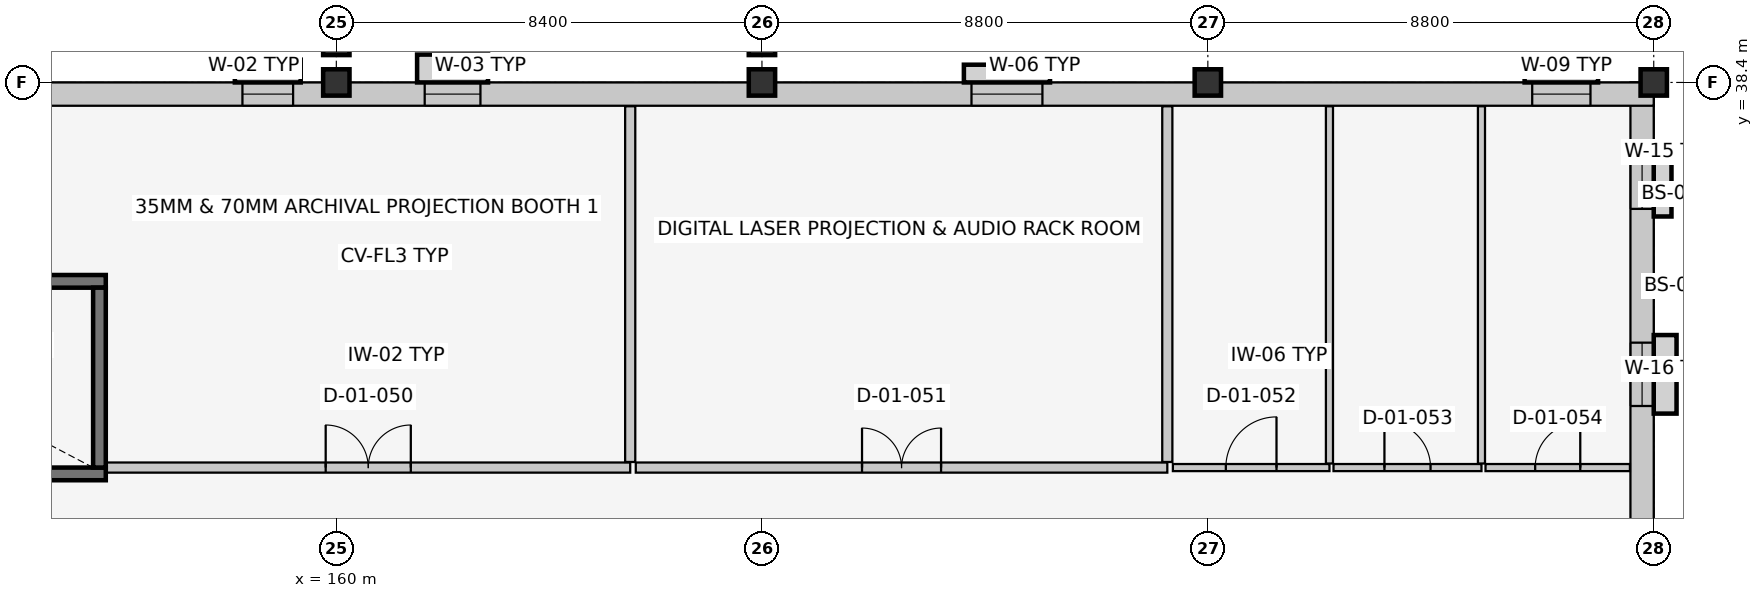
"""IFC4 building model, lengths in metres.
Left out: names, types, materials, properties, quantities, classifications, styles, units other than length and angle.
Written with IfcOpenShell. Run it as: python <this file> out.ifc"""

import sys

from ifc_helpers import new_model, si_unit, direction, frame, frame_2d, origin, origin_2d, place, context, subcontext, project, spatial, rectangle, extrude, element, fill, save


model = new_model("IFC4")
c1 = context("Model", 3, precision=1e-05, world=origin(), true_north=direction((0.0, 1.0)))
c2 = subcontext(c1, "Body", "Model", "MODEL_VIEW")
j1 = project(units=[si_unit("LENGTHUNIT", "METRE"), si_unit("PLANEANGLEUNIT", "RADIAN")], contexts=[c1])
p1 = place(None, origin())
s1 = spatial("IfcSite", under=j1, at=p1, CompositionType="ELEMENT")
p2 = place(p1, origin())
s2 = spatial("IfcBuilding", under=s1, at=p2, CompositionType="ELEMENT")
p3 = place(p2, frame((0.0, 0.0, 5.4)))
s3 = spatial("IfcBuildingStorey", under=s2, at=p3, CompositionType="ELEMENT", Elevation=5.4)
for number, where, z_axis, x_axis in (
    (1, (160.0, 38.4, 0.0), (0.0, 0.0, 1.0), (1.0, 0.0, 0.0)),
    (2, (168.4, 38.4, 0.0), (0.0, 0.0, 1.0), (1.0, 0.0, 0.0)),
    (3, (177.2, 38.4, 0.0), (0.0, 0.0, 1.0), (1.0, 0.0, 0.0)),
    (4, (186.0, 38.4, 0.0), (0.0, 0.0, 1.0), (1.0, 0.0, 0.0)),
    (5, (160.0, 39.2, 0.0), (0.0, 0.0, 1.0), (1.0, 0.0, 0.0)),
    (6, (168.4, 39.2, 0.0), (0.0, 0.0, 1.0), (1.0, 0.0, 0.0)),
):
    element("IfcColumn", number, at=place(p3, frame(where, z_axis=z_axis, x_axis=x_axis)), inside=s3, PredefinedType="COLUMN", context=c2, shape_type="SweptSolid", body=[
        extrude(rectangle(XDim=0.52, YDim=0.52, at=origin_2d()), origin(), (0.0, 0.0, 1.0), 4.2),
    ])
p4 = place(p3, frame((185.77, 38.4, 0.0), z_axis=(0.0, 0.0, 1.0), x_axis=(0.0, -1.0, 0.0)))
e7 = element("IfcWall", 7, at=p4, inside=s3, PredefinedType="SOLIDWALL", context=c2, shape_type="SweptSolid", body=[
    extrude(rectangle(XDim=38.4, YDim=0.46, at=frame_2d((19.2, 0.0))), origin(), (0.0, 0.0, 1.0), 3.095),
])
p5 = place(p4, frame((1.345, 0.0, 0.9)))
e8 = element("IfcOpeningElement", 8, at=p5, cuts=e7, PredefinedType="OPENING", context=c2, shape_type="SweptSolid", body=[
    extrude(rectangle(XDim=1.15, YDim=1.6, at=frame_2d((0.575, 0.8))), frame((0.0, 0.242, 0.0), z_axis=(0.0, -1.0, 0.0), x_axis=(1.0, 0.0, 0.0)), (0.0, 0.0, 1.0), 0.484),
])
p6 = place(p4, frame((5.135, 0.0, 0.9)))
e9 = element("IfcOpeningElement", 9, at=p6, cuts=e7, PredefinedType="OPENING", context=c2, shape_type="SweptSolid", body=[
    extrude(rectangle(XDim=1.25, YDim=1.6, at=frame_2d((0.625, 0.8))), frame((0.0, 0.242, 0.0), z_axis=(0.0, -1.0, 0.0), x_axis=(1.0, 0.0, 0.0)), (0.0, 0.0, 1.0), 0.484),
])
p7 = place(p3, frame((124.0, 38.17, 0.0), z_axis=(0.0, 0.0, 1.0), x_axis=(1.0, 0.0, 0.0)))
e10 = element("IfcWall", 10, at=p7, inside=s3, PredefinedType="SOLIDWALL", context=c2, shape_type="SweptSolid", body=[
    extrude(rectangle(XDim=62.0, YDim=0.46, at=frame_2d((31.0, 0.0))), origin(), (0.0, 0.0, 1.0), 3.095),
])
p8 = place(p7, frame((1.134, 0.0, 0.9)))
e11 = element("IfcOpeningElement", 11, at=p8, cuts=e10, PredefinedType="OPENING", context=c2, shape_type="SweptSolid", body=[
    extrude(rectangle(XDim=1.38, YDim=1.6, at=frame_2d((0.69, 0.8))), frame((0.0, 0.242, 0.0), z_axis=(0.0, -1.0, 0.0), x_axis=(1.0, 0.0, 0.0)), (0.0, 0.0, 1.0), 0.484),
])
p9 = place(p7, frame((4.721, 0.0, 0.9)))
e12 = element("IfcOpeningElement", 12, at=p9, cuts=e10, PredefinedType="OPENING", context=c2, shape_type="SweptSolid", body=[
    extrude(rectangle(XDim=1.5, YDim=1.6, at=frame_2d((0.75, 0.8))), frame((0.0, 0.242, 0.0), z_axis=(0.0, -1.0, 0.0), x_axis=(1.0, 0.0, 0.0)), (0.0, 0.0, 1.0), 0.484),
])
p10 = place(p7, frame((12.205, 0.0, 0.9)))
e13 = element("IfcOpeningElement", 13, at=p10, cuts=e10, PredefinedType="OPENING", context=c2, shape_type="SweptSolid", body=[
    extrude(rectangle(XDim=1.12, YDim=1.75, at=frame_2d((0.56, 0.875))), frame((0.0, 0.242, 0.0), z_axis=(0.0, -1.0, 0.0), x_axis=(1.0, 0.0, 0.0)), (0.0, 0.0, 1.0), 0.484),
])
p11 = place(p7, frame((15.792, 0.0, 0.9)))
e14 = element("IfcOpeningElement", 14, at=p11, cuts=e10, PredefinedType="OPENING", context=c2, shape_type="SweptSolid", body=[
    extrude(rectangle(XDim=1.24, YDim=1.75, at=frame_2d((0.62, 0.875))), frame((0.0, 0.242, 0.0), z_axis=(0.0, -1.0, 0.0), x_axis=(1.0, 0.0, 0.0)), (0.0, 0.0, 1.0), 0.484),
])
p12 = place(p7, frame((19.389, 0.0, 0.9)))
e15 = element("IfcOpeningElement", 15, at=p12, cuts=e10, PredefinedType="OPENING", context=c2, shape_type="SweptSolid", body=[
    extrude(rectangle(XDim=1.34, YDim=1.75, at=frame_2d((0.67, 0.875))), frame((0.0, 0.242, 0.0), z_axis=(0.0, -1.0, 0.0), x_axis=(1.0, 0.0, 0.0)), (0.0, 0.0, 1.0), 0.484),
])
p13 = place(p7, frame((34.147, 0.0, 0.9)))
e16 = element("IfcOpeningElement", 16, at=p13, cuts=e10, PredefinedType="OPENING", context=c2, shape_type="SweptSolid", body=[
    extrude(rectangle(XDim=1.0, YDim=1.35, at=frame_2d((0.5, 0.675))), frame((0.0, 0.242, 0.0), z_axis=(0.0, -1.0, 0.0), x_axis=(1.0, 0.0, 0.0)), (0.0, 0.0, 1.0), 0.484),
])
p14 = place(p7, frame((37.744, 0.0, 0.9)))
e17 = element("IfcOpeningElement", 17, at=p14, cuts=e10, PredefinedType="OPENING", context=c2, shape_type="SweptSolid", body=[
    extrude(rectangle(XDim=1.1, YDim=1.35, at=frame_2d((0.55, 0.675))), frame((0.0, 0.242, 0.0), z_axis=(0.0, -1.0, 0.0), x_axis=(1.0, 0.0, 0.0)), (0.0, 0.0, 1.0), 0.484),
])
p15 = place(p7, frame((48.535, 0.0, 0.9)))
e18 = element("IfcOpeningElement", 18, at=p15, cuts=e10, PredefinedType="OPENING", context=c2, shape_type="SweptSolid", body=[
    extrude(rectangle(XDim=1.4, YDim=1.35, at=frame_2d((0.7, 0.675))), frame((0.0, 0.242, 0.0), z_axis=(0.0, -1.0, 0.0), x_axis=(1.0, 0.0, 0.0)), (0.0, 0.0, 1.0), 0.484),
])
p16 = place(p7, frame((59.602, 0.0, 0.9)))
e19 = element("IfcOpeningElement", 19, at=p16, cuts=e10, PredefinedType="OPENING", context=c2, shape_type="SweptSolid", body=[
    extrude(rectangle(XDim=1.15, YDim=1.45, at=frame_2d((0.575, 0.725))), frame((0.0, 0.242, 0.0), z_axis=(0.0, -1.0, 0.0), x_axis=(1.0, 0.0, 0.0)), (0.0, 0.0, 1.0), 0.484),
])
for number, where, z_axis, x_axis in (
    (20, (146.55, 30.675, 0.0), (0.0, 0.0, 1.0), (1.0, 0.0, 0.0)),
    (21, (155.45, 34.475, 0.0), (0.0, 0.0, 1.0), (-1.0, 0.0, 0.0)),
):
    element("IfcWall", number, at=place(p3, frame(where, z_axis=z_axis, x_axis=x_axis)), inside=s3, PredefinedType="SHEAR", context=c2, shape_type="SweptSolid", body=[
        extrude(rectangle(XDim=8.9, YDim=0.25, at=frame_2d((4.45, 0.0))), origin(), (0.0, 0.0, 1.0), 3.94),
    ])
p17 = place(p3, frame((155.325, 30.8, 0.0), z_axis=(0.0, 0.0, 1.0), x_axis=(0.0, 1.0, 0.0)))
e22 = element("IfcWall", 22, at=p17, inside=s3, PredefinedType="SHEAR", context=c2, shape_type="SweptSolid", body=[
    extrude(rectangle(XDim=3.55, YDim=0.25, at=frame_2d((1.775, 0.0))), origin(), (0.0, 0.0, 1.0), 3.94),
])
p18 = place(p3, frame((155.46, 30.8, 0.0), z_axis=(0.0, 0.0, 1.0), x_axis=(1.0, 0.0, 0.0)))
e23 = element("IfcWall", 23, at=p18, inside=s3, PredefinedType="PARTITIONING", context=c2, shape_type="SweptSolid", body=[
    extrude(rectangle(XDim=10.34, YDim=0.2, at=frame_2d((5.17, 0.0))), origin(), (0.0, 0.0, 1.0), 3.94),
])
p19 = place(p18, frame((4.33, 0.0, 0.0)))
e24 = element("IfcOpeningElement", 24, at=p19, cuts=e23, PredefinedType="OPENING", context=c2, shape_type="SweptSolid", body=[
    extrude(rectangle(XDim=1.68, YDim=2.3, at=frame_2d((0.84, 1.15))), frame((0.0, 0.112, 0.0), z_axis=(0.0, -1.0, 0.0), x_axis=(1.0, 0.0, 0.0)), (0.0, 0.0, 1.0), 0.224),
])
p20 = place(p3, frame((165.8, 30.91, 0.0), z_axis=(0.0, 0.0, 1.0), x_axis=(0.0, 1.0, 0.0)))
e25 = element("IfcWall", 25, at=p20, inside=s3, PredefinedType="PARTITIONING", context=c2, shape_type="SweptSolid", body=[
    extrude(rectangle(XDim=7.02, YDim=0.2, at=frame_2d((3.51, 0.0))), origin(), (0.0, 0.0, 1.0), 3.94),
])
p21 = place(p3, frame((165.91, 30.8, 0.0), z_axis=(0.0, 0.0, 1.0), x_axis=(1.0, 0.0, 0.0)))
e26 = element("IfcWall", 26, at=p21, inside=s3, PredefinedType="PARTITIONING", context=c2, shape_type="SweptSolid", body=[
    extrude(rectangle(XDim=10.49, YDim=0.2, at=frame_2d((5.245, 0.0))), origin(), (0.0, 0.0, 1.0), 3.94),
])
p22 = place(p21, frame((4.465, 0.0, 0.0)))
e27 = element("IfcOpeningElement", 27, at=p22, cuts=e26, PredefinedType="OPENING", context=c2, shape_type="SweptSolid", body=[
    extrude(rectangle(XDim=1.56, YDim=2.25, at=frame_2d((0.78, 1.125))), frame((0.0, 0.112, 0.0), z_axis=(0.0, -1.0, 0.0), x_axis=(1.0, 0.0, 0.0)), (0.0, 0.0, 1.0), 0.224),
])
p23 = place(p3, frame((176.4, 30.91, 0.0), z_axis=(0.0, 0.0, 1.0), x_axis=(0.0, 1.0, 0.0)))
e28 = element("IfcWall", 28, at=p23, inside=s3, PredefinedType="PARTITIONING", context=c2, shape_type="SweptSolid", body=[
    extrude(rectangle(XDim=7.02, YDim=0.2, at=frame_2d((3.51, 0.0))), origin(), (0.0, 0.0, 1.0), 3.94),
])
p24 = place(p3, frame((176.51, 30.8, 0.0), z_axis=(0.0, 0.0, 1.0), x_axis=(1.0, 0.0, 0.0)))
e29 = element("IfcWall", 29, at=p24, inside=s3, PredefinedType="PARTITIONING", context=c2, shape_type="SweptSolid", body=[
    extrude(rectangle(XDim=3.09, YDim=0.14, at=frame_2d((1.545, 0.0))), origin(), (0.0, 0.0, 1.0), 3.94),
])
p25 = place(p24, frame((1.045, 0.0, 0.0)))
e30 = element("IfcOpeningElement", 30, at=p25, cuts=e29, PredefinedType="OPENING", context=c2, shape_type="SweptSolid", body=[
    extrude(rectangle(XDim=1.0, YDim=2.1, at=frame_2d((0.5, 1.05))), frame((0.0, 0.082, 0.0), z_axis=(0.0, -1.0, 0.0), x_axis=(1.0, 0.0, 0.0)), (0.0, 0.0, 1.0), 0.164),
])
p26 = place(p3, frame((179.6, 30.88, 0.0), z_axis=(0.0, 0.0, 1.0), x_axis=(0.0, 1.0, 0.0)))
e31 = element("IfcWall", 31, at=p26, inside=s3, PredefinedType="PARTITIONING", context=c2, shape_type="SweptSolid", body=[
    extrude(rectangle(XDim=7.05, YDim=0.14, at=frame_2d((3.525, 0.0))), origin(), (0.0, 0.0, 1.0), 3.94),
])
p27 = place(p3, frame((179.68, 30.8, 0.0), z_axis=(0.0, 0.0, 1.0), x_axis=(1.0, 0.0, 0.0)))
e32 = element("IfcWall", 32, at=p27, inside=s3, PredefinedType="PARTITIONING", context=c2, shape_type="SweptSolid", body=[
    extrude(rectangle(XDim=2.92, YDim=0.14, at=frame_2d((1.46, 0.0))), origin(), (0.0, 0.0, 1.0), 3.94),
])
p28 = place(p27, frame((1.005, 0.0, 0.0)))
e33 = element("IfcOpeningElement", 33, at=p28, cuts=e32, PredefinedType="OPENING", context=c2, shape_type="SweptSolid", body=[
    extrude(rectangle(XDim=0.91, YDim=2.06, at=frame_2d((0.455, 1.03))), frame((0.0, 0.082, 0.0), z_axis=(0.0, -1.0, 0.0), x_axis=(1.0, 0.0, 0.0)), (0.0, 0.0, 1.0), 0.164),
])
p29 = place(p3, frame((182.6, 30.88, 0.0), z_axis=(0.0, 0.0, 1.0), x_axis=(0.0, 1.0, 0.0)))
e34 = element("IfcWall", 34, at=p29, inside=s3, PredefinedType="PARTITIONING", context=c2, shape_type="SweptSolid", body=[
    extrude(rectangle(XDim=7.05, YDim=0.14, at=frame_2d((3.525, 0.0))), origin(), (0.0, 0.0, 1.0), 3.94),
])
p30 = place(p3, frame((182.68, 30.8, 0.0), z_axis=(0.0, 0.0, 1.0), x_axis=(1.0, 0.0, 0.0)))
e35 = element("IfcWall", 35, at=p30, inside=s3, PredefinedType="PARTITIONING", context=c2, shape_type="SweptSolid", body=[
    extrude(rectangle(XDim=2.85, YDim=0.14, at=frame_2d((1.425, 0.0))), origin(), (0.0, 0.0, 1.0), 3.94),
])
p31 = place(p30, frame((0.98, 0.0, 0.0)))
e36 = element("IfcOpeningElement", 36, at=p31, cuts=e35, PredefinedType="OPENING", context=c2, shape_type="SweptSolid", body=[
    extrude(rectangle(XDim=0.89, YDim=2.05, at=frame_2d((0.445, 1.025))), frame((0.0, 0.082, 0.0), z_axis=(0.0, -1.0, 0.0), x_axis=(1.0, 0.0, 0.0)), (0.0, 0.0, 1.0), 0.164),
])
p32 = place(p5, origin())
e37 = element("IfcWindow", 37, at=p32, inside=s3, PartitioningType="SINGLE_PANEL", PredefinedType="WINDOW", context=c2, shape_type="SweptSolid", body=[
    extrude(rectangle(XDim=1.15, YDim=1.6, at=frame_2d((0.575, 0.8))), frame((0.0, 0.03, 0.0), z_axis=(0.0, -1.0, 0.0), x_axis=(1.0, 0.0, 0.0)), (0.0, 0.0, 1.0), 0.06),
])
fill(e8, e37)
p33 = place(p6, origin())
e38 = element("IfcWindow", 38, at=p33, inside=s3, PartitioningType="SINGLE_PANEL", PredefinedType="WINDOW", context=c2, shape_type="SweptSolid", body=[
    extrude(rectangle(XDim=1.25, YDim=1.6, at=frame_2d((0.625, 0.8))), frame((0.0, 0.03, 0.0), z_axis=(0.0, -1.0, 0.0), x_axis=(1.0, 0.0, 0.0)), (0.0, 0.0, 1.0), 0.06),
])
fill(e9, e38)
p34 = place(p13, origin())
e39 = element("IfcWindow", 39, at=p34, inside=s3, PartitioningType="SINGLE_PANEL", PredefinedType="WINDOW", context=c2, shape_type="SweptSolid", body=[
    extrude(rectangle(XDim=1.0, YDim=1.35, at=frame_2d((0.5, 0.675))), frame((0.0, 0.03, 0.0), z_axis=(0.0, -1.0, 0.0), x_axis=(1.0, 0.0, 0.0)), (0.0, 0.0, 1.0), 0.06),
])
fill(e16, e39)
p35 = place(p14, origin())
e40 = element("IfcWindow", 40, at=p35, inside=s3, PartitioningType="SINGLE_PANEL", PredefinedType="WINDOW", context=c2, shape_type="SweptSolid", body=[
    extrude(rectangle(XDim=1.1, YDim=1.35, at=frame_2d((0.55, 0.675))), frame((0.0, 0.03, 0.0), z_axis=(0.0, -1.0, 0.0), x_axis=(1.0, 0.0, 0.0)), (0.0, 0.0, 1.0), 0.06),
])
fill(e17, e40)
p36 = place(p15, origin())
e41 = element("IfcWindow", 41, at=p36, inside=s3, PartitioningType="SINGLE_PANEL", PredefinedType="WINDOW", context=c2, shape_type="SweptSolid", body=[
    extrude(rectangle(XDim=1.4, YDim=1.35, at=frame_2d((0.7, 0.675))), frame((0.0, 0.03, 0.0), z_axis=(0.0, -1.0, 0.0), x_axis=(1.0, 0.0, 0.0)), (0.0, 0.0, 1.0), 0.06),
])
fill(e18, e41)
p37 = place(p16, origin())
e42 = element("IfcWindow", 42, at=p37, inside=s3, PartitioningType="SINGLE_PANEL", PredefinedType="WINDOW", context=c2, shape_type="SweptSolid", body=[
    extrude(rectangle(XDim=1.15, YDim=1.45, at=frame_2d((0.575, 0.725))), frame((0.0, 0.03, 0.0), z_axis=(0.0, -1.0, 0.0), x_axis=(1.0, 0.0, 0.0)), (0.0, 0.0, 1.0), 0.06),
])
fill(e19, e42)
p38 = place(p19, origin())
e43 = element("IfcDoor", 43, at=p38, inside=s3, OperationType="DOUBLE_DOOR_SINGLE_SWING", PredefinedType="DOOR", context=c2, shape_type="SweptSolid", body=[
    extrude(rectangle(XDim=1.68, YDim=2.3, at=frame_2d((0.84, 1.15))), frame((0.0, 0.025, 0.0), z_axis=(0.0, -1.0, 0.0), x_axis=(1.0, 0.0, 0.0)), (0.0, 0.0, 1.0), 0.05),
])
fill(e24, e43)
p39 = place(p22, origin())
e44 = element("IfcDoor", 44, at=p39, inside=s3, OperationType="DOUBLE_DOOR_SINGLE_SWING", PredefinedType="DOOR", context=c2, shape_type="SweptSolid", body=[
    extrude(rectangle(XDim=1.56, YDim=2.25, at=frame_2d((0.78, 1.125))), frame((0.0, 0.025, 0.0), z_axis=(0.0, -1.0, 0.0), x_axis=(1.0, 0.0, 0.0)), (0.0, 0.0, 1.0), 0.05),
])
fill(e27, e44)
p40 = place(p25, origin())
e45 = element("IfcDoor", 45, at=p40, inside=s3, OperationType="SINGLE_SWING_RIGHT", PredefinedType="DOOR", context=c2, shape_type="SweptSolid", body=[
    extrude(rectangle(XDim=1.0, YDim=2.1, at=frame_2d((0.5, 1.05))), frame((0.0, 0.025, 0.0), z_axis=(0.0, -1.0, 0.0), x_axis=(1.0, 0.0, 0.0)), (0.0, 0.0, 1.0), 0.05),
])
fill(e30, e45)
p41 = place(p28, origin())
e46 = element("IfcDoor", 46, at=p41, inside=s3, OperationType="SINGLE_SWING_LEFT", PredefinedType="DOOR", context=c2, shape_type="SweptSolid", body=[
    extrude(rectangle(XDim=0.91, YDim=2.06, at=frame_2d((0.455, 1.03))), frame((0.0, 0.025, 0.0), z_axis=(0.0, -1.0, 0.0), x_axis=(1.0, 0.0, 0.0)), (0.0, 0.0, 1.0), 0.05),
])
fill(e33, e46)
p42 = place(p31, origin())
e47 = element("IfcDoor", 47, at=p42, inside=s3, OperationType="SINGLE_SWING_RIGHT", PredefinedType="DOOR", context=c2, shape_type="SweptSolid", body=[
    extrude(rectangle(XDim=0.89, YDim=2.05, at=frame_2d((0.445, 1.025))), frame((0.0, 0.025, 0.0), z_axis=(0.0, -1.0, 0.0), x_axis=(1.0, 0.0, 0.0)), (0.0, 0.0, 1.0), 0.05),
])
fill(e36, e47)
save(model, sys.argv[1])
